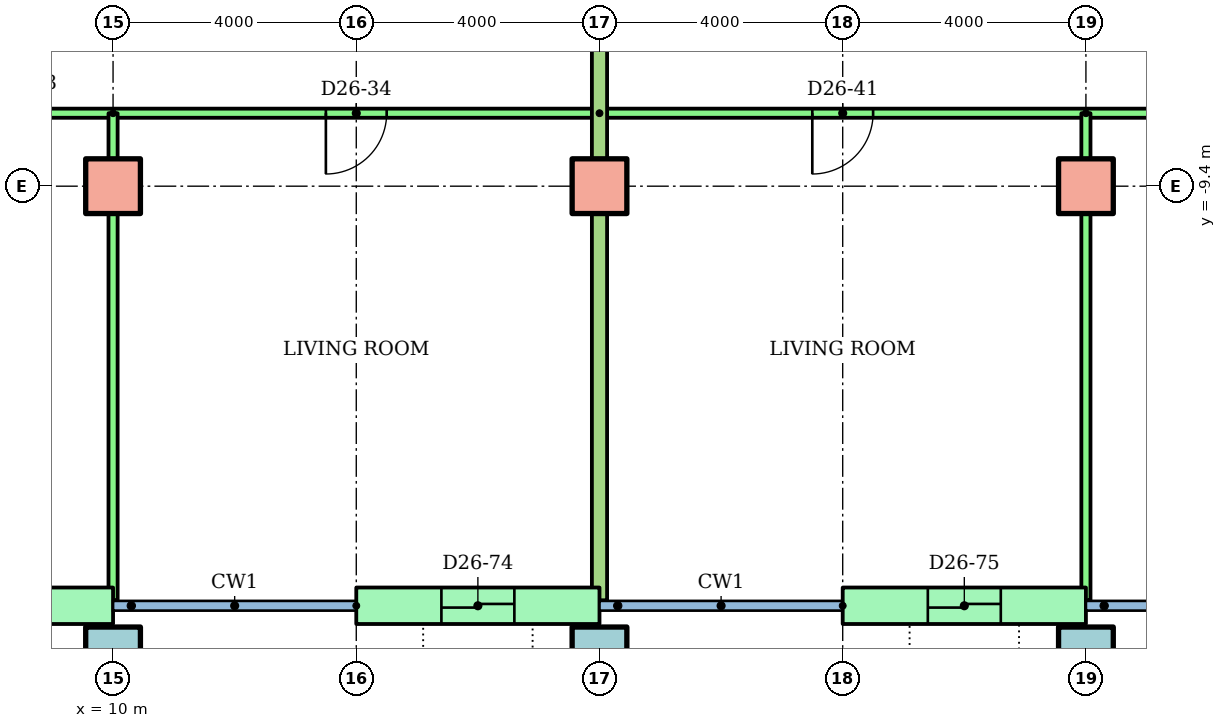
"""IFC4 building model, lengths in metres.
Left out: names, types, materials, properties, quantities, classifications, styles, units other than length and angle.
Written with IfcOpenShell. Run it as: python <this file> out.ifc"""

import sys

from ifc_helpers import new_model, si_unit, direction, frame, frame_2d, origin, origin_2d, place, context, subcontext, project, spatial, rectangle, hollow_rectangle, extrude, element, fill, save


model = new_model("IFC4")
c1 = context("Model", 3, precision=1e-05, world=origin(), true_north=direction((0.0, 1.0)))
c2 = subcontext(c1, "Body", "Model", "MODEL_VIEW")
j1 = project(units=[si_unit("LENGTHUNIT", "METRE"), si_unit("PLANEANGLEUNIT", "RADIAN")], contexts=[c1])
p1 = place(None, origin())
s1 = spatial("IfcSite", under=j1, at=p1, CompositionType="ELEMENT")
p2 = place(p1, origin())
s2 = spatial("IfcBuilding", under=s1, at=p2, CompositionType="ELEMENT")
p3 = place(p2, frame((0.0, 0.0, 99.9)))
s3 = spatial("IfcBuildingStorey", under=s2, at=p3, CompositionType="ELEMENT", Elevation=99.9)
for number, where in (
    (1, (10.0, -17.1, 0.0)),
    (2, (18.0, -17.1, 0.0)),
    (3, (26.0, -17.1, 0.0)),
):
    element("IfcColumn", number, at=place(p3, frame(where)), inside=s3, PredefinedType="COLUMN", context=c2, shape_type="SweptSolid", body=[
        extrude(hollow_rectangle(XDim=0.9, YDim=0.9, WallThickness=0.045, at=origin_2d()), origin(), (0.0, 0.0, 1.0), 3.2),
    ])
for number, where in (
    (4, (10.0, -9.4, 0.0)),
    (5, (18.0, -9.4, 0.0)),
    (6, (26.0, -9.4, 0.0)),
):
    element("IfcColumn", number, at=place(p3, frame(where)), inside=s3, PredefinedType="COLUMN", context=c2, shape_type="SweptSolid", body=[
        extrude(rectangle(XDim=0.9, YDim=0.9, at=origin_2d()), origin(), (0.0, 0.0, 1.0), 3.2),
    ])
p4 = place(p3, frame((6.0, -16.3, 0.0)))
e7 = element("IfcWall", 7, at=p4, inside=s3, PredefinedType="STANDARD", context=c2, shape_type="SweptSolid", body=[
    extrude(rectangle(XDim=4.0, YDim=0.6, at=frame_2d((2.0, 0.0))), origin(), (0.0, 0.0, 1.0), 2.92),
])
p5 = place(p4, frame((1.4, 0.0, 0.0)))
e8 = element("IfcOpeningElement", 8, at=p5, cuts=e7, PredefinedType="OPENING", context=c2, shape_type="SweptSolid", body=[
    extrude(rectangle(XDim=1.2, YDim=2.1, at=frame_2d((0.6, 1.05))), frame((0.0, 0.31, 0.0), z_axis=(0.0, -1.0, 0.0), x_axis=(1.0, 0.0, 0.0)), (0.0, 0.0, 1.0), 0.62),
])
p6 = place(p3, frame((14.0, -16.3, 0.0)))
e9 = element("IfcWall", 9, at=p6, inside=s3, PredefinedType="STANDARD", context=c2, shape_type="SweptSolid", body=[
    extrude(rectangle(XDim=4.0, YDim=0.6, at=frame_2d((2.0, 0.0))), origin(), (0.0, 0.0, 1.0), 2.92),
])
p7 = place(p6, frame((1.4, 0.0, 0.0)))
e10 = element("IfcOpeningElement", 10, at=p7, cuts=e9, PredefinedType="OPENING", context=c2, shape_type="SweptSolid", body=[
    extrude(rectangle(XDim=1.2, YDim=2.1, at=frame_2d((0.6, 1.05))), frame((0.0, 0.31, 0.0), z_axis=(0.0, -1.0, 0.0), x_axis=(1.0, 0.0, 0.0)), (0.0, 0.0, 1.0), 0.62),
])
p8 = place(p3, frame((22.0, -16.3, 0.0)))
e11 = element("IfcWall", 11, at=p8, inside=s3, PredefinedType="STANDARD", context=c2, shape_type="SweptSolid", body=[
    extrude(rectangle(XDim=4.0, YDim=0.6, at=frame_2d((2.0, 0.0))), origin(), (0.0, 0.0, 1.0), 2.92),
])
p9 = place(p8, frame((1.4, 0.0, 0.0)))
e12 = element("IfcOpeningElement", 12, at=p9, cuts=e11, PredefinedType="OPENING", context=c2, shape_type="SweptSolid", body=[
    extrude(rectangle(XDim=1.2, YDim=2.1, at=frame_2d((0.6, 1.05))), frame((0.0, 0.31, 0.0), z_axis=(0.0, -1.0, 0.0), x_axis=(1.0, 0.0, 0.0)), (0.0, 0.0, 1.0), 0.62),
])
p10 = place(p3, frame((18.0, -8.2, 0.0), z_axis=(0.0, 0.0, 1.0), x_axis=(-1.0, 0.0, 0.0)))
e13 = element("IfcWall", 13, at=p10, inside=s3, PredefinedType="PARTITIONING", context=c2, shape_type="SweptSolid", body=[
    extrude(rectangle(XDim=24.0, YDim=0.15, at=frame_2d((12.0, 0.0))), origin(), (0.0, 0.0, 1.0), 2.4),
])
p11 = place(p10, frame((21.55, 0.0, 0.0)))
e14 = element("IfcOpeningElement", 14, at=p11, cuts=e13, PredefinedType="OPENING", context=c2, shape_type="SweptSolid", body=[
    extrude(rectangle(XDim=0.9, YDim=2.1, at=frame_2d((0.45, 1.05))), frame((0.0, 0.085, 0.0), z_axis=(0.0, -1.0, 0.0), x_axis=(1.0, 0.0, 0.0)), (0.0, 0.0, 1.0), 0.17),
])
p12 = place(p10, frame((17.55, 0.0, 0.0)))
e15 = element("IfcOpeningElement", 15, at=p12, cuts=e13, PredefinedType="OPENING", context=c2, shape_type="SweptSolid", body=[
    extrude(rectangle(XDim=0.9, YDim=2.1, at=frame_2d((0.45, 1.05))), frame((0.0, 0.085, 0.0), z_axis=(0.0, -1.0, 0.0), x_axis=(1.0, 0.0, 0.0)), (0.0, 0.0, 1.0), 0.17),
])
p13 = place(p10, frame((13.55, 0.0, 0.0)))
e16 = element("IfcOpeningElement", 16, at=p13, cuts=e13, PredefinedType="OPENING", context=c2, shape_type="SweptSolid", body=[
    extrude(rectangle(XDim=0.9, YDim=2.1, at=frame_2d((0.45, 1.05))), frame((0.0, 0.085, 0.0), z_axis=(0.0, -1.0, 0.0), x_axis=(1.0, 0.0, 0.0)), (0.0, 0.0, 1.0), 0.17),
])
p14 = place(p10, frame((9.55, 0.0, 0.0)))
e17 = element("IfcOpeningElement", 17, at=p14, cuts=e13, PredefinedType="OPENING", context=c2, shape_type="SweptSolid", body=[
    extrude(rectangle(XDim=0.9, YDim=2.1, at=frame_2d((0.45, 1.05))), frame((0.0, 0.085, 0.0), z_axis=(0.0, -1.0, 0.0), x_axis=(1.0, 0.0, 0.0)), (0.0, 0.0, 1.0), 0.17),
])
p15 = place(p10, frame((3.5, 0.0, 0.0)))
e18 = element("IfcOpeningElement", 18, at=p15, cuts=e13, PredefinedType="OPENING", context=c2, shape_type="SweptSolid", body=[
    extrude(rectangle(XDim=1.0, YDim=2.1, at=frame_2d((0.5, 1.05))), frame((0.0, 0.085, 0.0), z_axis=(0.0, -1.0, 0.0), x_axis=(1.0, 0.0, 0.0)), (0.0, 0.0, 1.0), 0.17),
])
p16 = place(p3, frame((10.0, -8.2, 0.0), z_axis=(0.0, 0.0, 1.0), x_axis=(0.0, -1.0, 0.0)))
e19 = element("IfcWall", 19, at=p16, inside=s3, PredefinedType="PARTITIONING", context=c2, shape_type="SweptSolid", body=[
    extrude(rectangle(XDim=8.01, YDim=0.15, at=frame_2d((4.005, 0.0))), origin(), (0.0, 0.0, 1.0), 2.4),
])
p17 = place(p3, frame((40.62, -8.2, 0.0), z_axis=(0.0, 0.0, 1.0), x_axis=(-1.0, 0.0, 0.0)))
e20 = element("IfcWall", 20, at=p17, inside=s3, PredefinedType="PARTITIONING", context=c2, shape_type="SweptSolid", body=[
    extrude(rectangle(XDim=22.62, YDim=0.15, at=frame_2d((11.31, 0.0))), origin(), (0.0, 0.0, 1.0), 2.4),
])
p18 = place(p17, frame((18.12, 0.0, 0.0)))
e21 = element("IfcOpeningElement", 21, at=p18, cuts=e20, PredefinedType="OPENING", context=c2, shape_type="SweptSolid", body=[
    extrude(rectangle(XDim=1.0, YDim=2.1, at=frame_2d((0.5, 1.05))), frame((0.0, 0.085, 0.0), z_axis=(0.0, -1.0, 0.0), x_axis=(1.0, 0.0, 0.0)), (0.0, 0.0, 1.0), 0.17),
])
p19 = place(p17, frame((12.17, 0.0, 0.0)))
e22 = element("IfcOpeningElement", 22, at=p19, cuts=e20, PredefinedType="OPENING", context=c2, shape_type="SweptSolid", body=[
    extrude(rectangle(XDim=0.9, YDim=2.1, at=frame_2d((0.45, 1.05))), frame((0.0, 0.085, 0.0), z_axis=(0.0, -1.0, 0.0), x_axis=(1.0, 0.0, 0.0)), (0.0, 0.0, 1.0), 0.17),
])
p20 = place(p17, frame((8.17, 0.0, 0.0)))
e23 = element("IfcOpeningElement", 23, at=p20, cuts=e20, PredefinedType="OPENING", context=c2, shape_type="SweptSolid", body=[
    extrude(rectangle(XDim=0.9, YDim=2.1, at=frame_2d((0.45, 1.05))), frame((0.0, 0.085, 0.0), z_axis=(0.0, -1.0, 0.0), x_axis=(1.0, 0.0, 0.0)), (0.0, 0.0, 1.0), 0.17),
])
p21 = place(p17, frame((2.97, 0.0, 0.0)))
e24 = element("IfcOpeningElement", 24, at=p21, cuts=e20, PredefinedType="OPENING", context=c2, shape_type="SweptSolid", body=[
    extrude(rectangle(XDim=0.9, YDim=2.1, at=frame_2d((0.45, 1.05))), frame((0.0, 0.085, 0.0), z_axis=(0.0, -1.0, 0.0), x_axis=(1.0, 0.0, 0.0)), (0.0, 0.0, 1.0), 0.17),
])
p22 = place(p3, frame((26.0, -8.2, 0.0), z_axis=(0.0, 0.0, 1.0), x_axis=(0.0, -1.0, 0.0)))
e25 = element("IfcWall", 25, at=p22, inside=s3, PredefinedType="PARTITIONING", context=c2, shape_type="SweptSolid", body=[
    extrude(rectangle(XDim=8.01, YDim=0.15, at=frame_2d((4.005, 0.0))), origin(), (0.0, 0.0, 1.0), 2.4),
])
p23 = place(p3, frame((18.0, -1.4, 0.0), z_axis=(0.0, 0.0, 1.0), x_axis=(0.0, -1.0, 0.0)))
e26 = element("IfcWall", 26, at=p23, inside=s3, PredefinedType="PARTITIONING", context=c2, shape_type="SweptSolid", body=[
    extrude(rectangle(XDim=14.81, YDim=0.25, at=frame_2d((7.405, 0.0))), origin(), (0.0, 0.0, 1.0), 2.4),
])
p24 = place(p15, origin())
e27 = element("IfcDoor", 27, at=p24, inside=s3, OperationType="SINGLE_SWING_RIGHT", PredefinedType="DOOR", context=c2, shape_type="SweptSolid", body=[
    extrude(rectangle(XDim=1.0, YDim=2.1, at=frame_2d((0.5, 1.05))), frame((0.0, 0.025, 0.0), z_axis=(0.0, -1.0, 0.0), x_axis=(1.0, 0.0, 0.0)), (0.0, 0.0, 1.0), 0.05),
])
fill(e18, e27)
p25 = place(p18, origin())
e28 = element("IfcDoor", 28, at=p25, inside=s3, OperationType="SINGLE_SWING_RIGHT", PredefinedType="DOOR", context=c2, shape_type="SweptSolid", body=[
    extrude(rectangle(XDim=1.0, YDim=2.1, at=frame_2d((0.5, 1.05))), frame((0.0, 0.025, 0.0), z_axis=(0.0, -1.0, 0.0), x_axis=(1.0, 0.0, 0.0)), (0.0, 0.0, 1.0), 0.05),
])
fill(e21, e28)
p26 = place(p7, origin())
e29 = element("IfcDoor", 29, at=p26, inside=s3, OperationType="SLIDING_TO_LEFT", PredefinedType="DOOR", context=c2, shape_type="SweptSolid", body=[
    extrude(rectangle(XDim=1.2, YDim=2.1, at=frame_2d((0.6, 1.05))), frame((0.0, 0.025, 0.0), z_axis=(0.0, -1.0, 0.0), x_axis=(1.0, 0.0, 0.0)), (0.0, 0.0, 1.0), 0.05),
])
fill(e10, e29)
p27 = place(p9, origin())
e30 = element("IfcDoor", 30, at=p27, inside=s3, OperationType="SLIDING_TO_LEFT", PredefinedType="DOOR", context=c2, shape_type="SweptSolid", body=[
    extrude(rectangle(XDim=1.2, YDim=2.1, at=frame_2d((0.6, 1.05))), frame((0.0, 0.025, 0.0), z_axis=(0.0, -1.0, 0.0), x_axis=(1.0, 0.0, 0.0)), (0.0, 0.0, 1.0), 0.05),
])
fill(e12, e30)
save(model, sys.argv[1])
